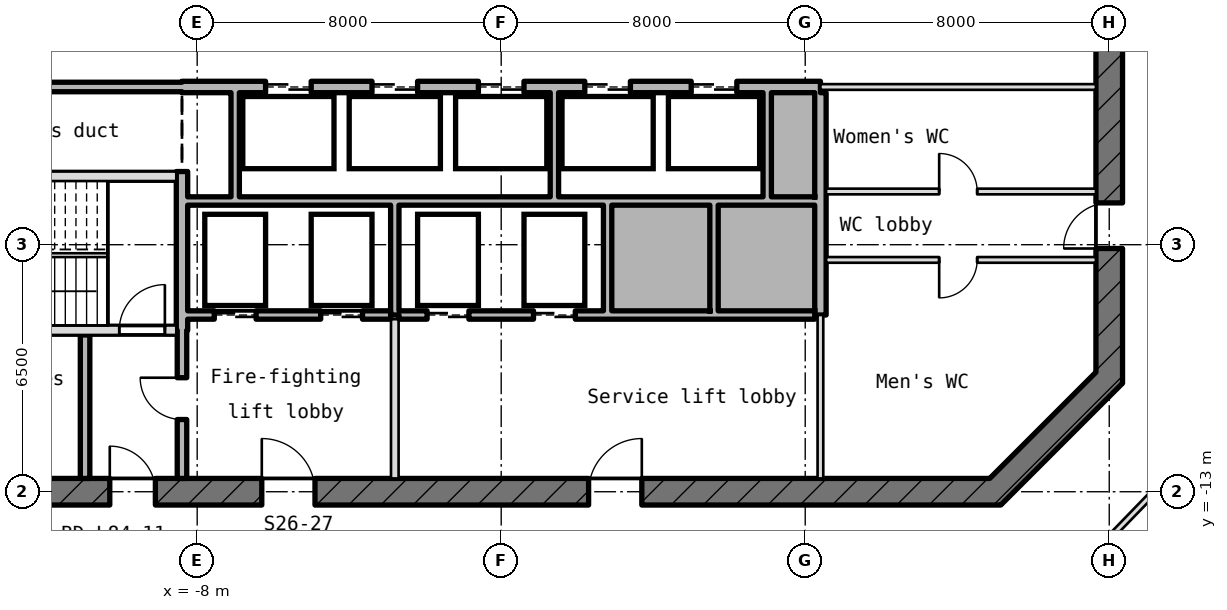
"""IFC4 building model, lengths in metres.
Left out: names, types, materials, properties, quantities, classifications, styles, units other than length and angle.
Written with IfcOpenShell. Run it as: python <this file> out.ifc"""

import sys

from ifc_helpers import new_model, si_unit, direction, frame, frame_2d, origin, place, context, subcontext, project, spatial, rectangle, extrude, element, fill, save


model = new_model("IFC4")
c1 = context("Model", 3, precision=1e-05, world=origin(), true_north=direction((0.0, 1.0)))
c2 = subcontext(c1, "Body", "Model", "MODEL_VIEW")
j1 = project(units=[si_unit("LENGTHUNIT", "METRE"), si_unit("PLANEANGLEUNIT", "RADIAN")], contexts=[c1])
p1 = place(None, origin())
s1 = spatial("IfcSite", under=j1, at=p1, CompositionType="ELEMENT")
p2 = place(p1, origin())
s2 = spatial("IfcBuilding", under=s1, at=p2, CompositionType="ELEMENT")
p3 = place(p2, frame((0.0, 0.0, 371.65)))
s3 = spatial("IfcBuildingStorey", under=s2, at=p3, CompositionType="ELEMENT", Elevation=371.65)
p4 = place(p3, frame((12.897, -13.103, -0.18), z_axis=(0.0, 0.0, 1.0), x_axis=(0.707106781187, 0.707106781187, 0.0)))
e1 = element("IfcWall", 1, at=p4, inside=s3, PredefinedType="SHEAR", context=c2, shape_type="SweptSolid", body=[
    extrude(rectangle(XDim=4.533, YDim=0.7, at=frame_2d((2.266, 0.0))), origin(), (0.0, 0.0, 1.0), 4.15),
])
p5 = place(p3, frame((16.0, -10.145, -0.18), z_axis=(0.0, 0.0, 1.0), x_axis=(0.0, 1.0, 0.0)))
e2 = element("IfcWall", 2, at=p5, inside=s3, PredefinedType="SHEAR", context=c2, shape_type="SweptSolid", body=[
    extrude(rectangle(XDim=20.29, YDim=0.7, at=frame_2d((10.145, 0.0))), origin(), (0.0, 0.0, 1.0), 4.15),
])
p6 = place(p5, frame((8.945, 0.0, 0.18)))
e3 = element("IfcOpeningElement", 3, at=p6, cuts=e2, PredefinedType="OPENING", context=c2, shape_type="SweptSolid", body=[
    extrude(rectangle(XDim=2.4, YDim=2.1, at=frame_2d((1.2, 1.05))), frame((0.0, 0.36, 0.0), z_axis=(0.0, -1.0, 0.0), x_axis=(1.0, 0.0, 0.0)), (0.0, 0.0, 1.0), 0.72),
])
p7 = place(p5, frame((13.545, 0.0, 0.18)))
e4 = element("IfcOpeningElement", 4, at=p7, cuts=e2, PredefinedType="OPENING", context=c2, shape_type="SweptSolid", body=[
    extrude(rectangle(XDim=1.2, YDim=2.1, at=frame_2d((0.6, 1.05))), frame((0.0, 0.36, 0.0), z_axis=(0.0, -1.0, 0.0), x_axis=(1.0, 0.0, 0.0)), (0.0, 0.0, 1.0), 0.72),
])
p8 = place(p5, frame((3.545, 0.0, 0.18)))
e5 = element("IfcOpeningElement", 5, at=p8, cuts=e2, PredefinedType="OPENING", context=c2, shape_type="SweptSolid", body=[
    extrude(rectangle(XDim=1.2, YDim=2.1, at=frame_2d((0.6, 1.05))), frame((0.0, 0.36, 0.0), z_axis=(0.0, -1.0, 0.0), x_axis=(1.0, 0.0, 0.0)), (0.0, 0.0, 1.0), 0.72),
])
p9 = place(p3, frame((-13.145, -13.0, -0.18), z_axis=(0.0, 0.0, 1.0), x_axis=(1.0, 0.0, 0.0)))
e6 = element("IfcWall", 6, at=p9, inside=s3, PredefinedType="SHEAR", context=c2, shape_type="SweptSolid", body=[
    extrude(rectangle(XDim=26.29, YDim=0.7, at=frame_2d((13.145, 0.0))), origin(), (0.0, 0.0, 1.0), 4.15),
])
p10 = place(p9, frame((2.845, 0.0, 0.18)))
e7 = element("IfcOpeningElement", 7, at=p10, cuts=e6, PredefinedType="OPENING", context=c2, shape_type="SweptSolid", body=[
    extrude(rectangle(XDim=1.2, YDim=2.1, at=frame_2d((0.6, 1.05))), frame((0.0, 0.36, 0.0), z_axis=(0.0, -1.0, 0.0), x_axis=(1.0, 0.0, 0.0)), (0.0, 0.0, 1.0), 0.72),
])
p11 = place(p9, frame((6.845, 0.0, 0.18)))
e8 = element("IfcOpeningElement", 8, at=p11, cuts=e6, PredefinedType="OPENING", context=c2, shape_type="SweptSolid", body=[
    extrude(rectangle(XDim=1.4, YDim=2.1, at=frame_2d((0.7, 1.05))), frame((0.0, 0.36, 0.0), z_axis=(0.0, -1.0, 0.0), x_axis=(1.0, 0.0, 0.0)), (0.0, 0.0, 1.0), 0.72),
])
p12 = place(p9, frame((15.445, 0.0, 0.18)))
e9 = element("IfcOpeningElement", 9, at=p12, cuts=e6, PredefinedType="OPENING", context=c2, shape_type="SweptSolid", body=[
    extrude(rectangle(XDim=1.4, YDim=2.1, at=frame_2d((0.7, 1.05))), frame((0.0, 0.36, 0.0), z_axis=(0.0, -1.0, 0.0), x_axis=(1.0, 0.0, 0.0)), (0.0, 0.0, 1.0), 0.72),
])
p13 = place(p3, frame((-15.65, -8.75, -0.18), z_axis=(0.0, 0.0, 1.0), x_axis=(1.0, 0.0, 0.0)))
e10 = element("IfcWall", 10, at=p13, inside=s3, PredefinedType="SHEAR", context=c2, shape_type="SweptSolid", body=[
    extrude(rectangle(XDim=7.1, YDim=0.25, at=frame_2d((3.55, 0.0))), origin(), (0.0, 0.0, 1.0), 4.15),
])
p14 = place(p13, frame((5.6, 0.0, 0.18)))
e11 = element("IfcOpeningElement", 11, at=p14, cuts=e10, PredefinedType="OPENING", context=c2, shape_type="SweptSolid", body=[
    extrude(rectangle(XDim=1.2, YDim=2.1, at=frame_2d((0.6, 1.05))), frame((0.0, 0.135, 0.0), z_axis=(0.0, -1.0, 0.0), x_axis=(1.0, 0.0, 0.0)), (0.0, 0.0, 1.0), 0.27),
])
p15 = place(p3, frame((-8.25, -8.35, 0.0), z_axis=(0.0, 0.0, 1.0), x_axis=(1.0, 0.0, 0.0)))
e12 = element("IfcWall", 12, at=p15, inside=s3, PredefinedType="STANDARD", context=c2, shape_type="SweptSolid", body=[
    extrude(rectangle(XDim=5.34, YDim=0.22, at=frame_2d((2.67, 0.0))), origin(), (0.0, 0.0, 1.0), 3.97),
])
p16 = place(p15, frame((0.7, 0.0, 0.0)))
e13 = element("IfcOpeningElement", 13, at=p16, cuts=e12, PredefinedType="OPENING", context=c2, shape_type="SweptSolid", body=[
    extrude(rectangle(XDim=1.1, YDim=2.1, at=frame_2d((0.55, 1.05))), frame((0.0, 0.12, 0.0), z_axis=(0.0, -1.0, 0.0), x_axis=(1.0, 0.0, 0.0)), (0.0, 0.0, 1.0), 0.24),
])
p17 = place(p15, frame((3.5, 0.0, 0.0)))
e14 = element("IfcOpeningElement", 14, at=p17, cuts=e12, PredefinedType="OPENING", context=c2, shape_type="SweptSolid", body=[
    extrude(rectangle(XDim=1.1, YDim=2.1, at=frame_2d((0.55, 1.05))), frame((0.0, 0.12, 0.0), z_axis=(0.0, -1.0, 0.0), x_axis=(1.0, 0.0, 0.0)), (0.0, 0.0, 1.0), 0.24),
])
p18 = place(p3, frame((-2.69, -8.35, 0.0), z_axis=(0.0, 0.0, 1.0), x_axis=(1.0, 0.0, 0.0)))
e15 = element("IfcWall", 15, at=p18, inside=s3, PredefinedType="STANDARD", context=c2, shape_type="SweptSolid", body=[
    extrude(rectangle(XDim=10.94, YDim=0.22, at=frame_2d((5.47, 0.0))), origin(), (0.0, 0.0, 1.0), 3.97),
])
p19 = place(p18, frame((0.74, 0.0, 0.0)))
e16 = element("IfcOpeningElement", 16, at=p19, cuts=e15, PredefinedType="OPENING", context=c2, shape_type="SweptSolid", body=[
    extrude(rectangle(XDim=1.1, YDim=2.1, at=frame_2d((0.55, 1.05))), frame((0.0, 0.12, 0.0), z_axis=(0.0, -1.0, 0.0), x_axis=(1.0, 0.0, 0.0)), (0.0, 0.0, 1.0), 0.24),
])
p20 = place(p18, frame((3.54, 0.0, 0.0)))
e17 = element("IfcOpeningElement", 17, at=p20, cuts=e15, PredefinedType="OPENING", context=c2, shape_type="SweptSolid", body=[
    extrude(rectangle(XDim=1.1, YDim=2.1, at=frame_2d((0.55, 1.05))), frame((0.0, 0.12, 0.0), z_axis=(0.0, -1.0, 0.0), x_axis=(1.0, 0.0, 0.0)), (0.0, 0.0, 1.0), 0.24),
])
p21 = place(p3, frame((8.55, -6.9, 0.0), z_axis=(0.0, 0.0, 1.0), x_axis=(1.0, 0.0, 0.0)))
e18 = element("IfcWall", 18, at=p21, inside=s3, PredefinedType="PARTITIONING", context=c2, shape_type="SweptSolid", body=[
    extrude(rectangle(XDim=7.1, YDim=0.15, at=frame_2d((3.55, 0.0))), origin(), (0.0, 0.0, 1.0), 3.97),
])
p22 = place(p21, frame((2.975, 0.0, 0.0)))
e19 = element("IfcOpeningElement", 19, at=p22, cuts=e18, PredefinedType="OPENING", context=c2, shape_type="SweptSolid", body=[
    extrude(rectangle(XDim=1.0, YDim=2.1, at=frame_2d((0.5, 1.05))), frame((0.0, 0.085, 0.0), z_axis=(0.0, -1.0, 0.0), x_axis=(1.0, 0.0, 0.0)), (0.0, 0.0, 1.0), 0.17),
])
p23 = place(p3, frame((-8.25, -5.35, 0.0), z_axis=(0.0, 0.0, 1.0), x_axis=(1.0, 0.0, 0.0)))
e20 = element("IfcWall", 20, at=p23, inside=s3, PredefinedType="STANDARD", context=c2, shape_type="SweptSolid", body=[
    extrude(rectangle(XDim=16.5, YDim=0.22, at=frame_2d((8.25, 0.0))), origin(), (0.0, 0.0, 1.0), 3.97),
])
p24 = place(p3, frame((8.55, -5.1, 0.0), z_axis=(0.0, 0.0, 1.0), x_axis=(1.0, 0.0, 0.0)))
e21 = element("IfcWall", 21, at=p24, inside=s3, PredefinedType="PARTITIONING", context=c2, shape_type="SweptSolid", body=[
    extrude(rectangle(XDim=7.1, YDim=0.15, at=frame_2d((3.55, 0.0))), origin(), (0.0, 0.0, 1.0), 3.97),
])
p25 = place(p24, frame((2.975, 0.0, 0.0)))
e22 = element("IfcOpeningElement", 22, at=p25, cuts=e21, PredefinedType="OPENING", context=c2, shape_type="SweptSolid", body=[
    extrude(rectangle(XDim=1.0, YDim=2.1, at=frame_2d((0.5, 1.05))), frame((0.0, 0.085, 0.0), z_axis=(0.0, -1.0, 0.0), x_axis=(1.0, 0.0, 0.0)), (0.0, 0.0, 1.0), 0.17),
])
p26 = place(p3, frame((-15.65, -4.7, -0.18), z_axis=(0.0, 0.0, 1.0), x_axis=(1.0, 0.0, 0.0)))
e23 = element("IfcWall", 23, at=p26, inside=s3, PredefinedType="SHEAR", context=c2, shape_type="SweptSolid", body=[
    extrude(rectangle(XDim=7.1, YDim=0.25, at=frame_2d((3.55, 0.0))), origin(), (0.0, 0.0, 1.0), 4.15),
])
p27 = place(p3, frame((-15.65, -2.35, 0.0), z_axis=(0.0, 0.0, 1.0), x_axis=(1.0, 0.0, 0.0)))
e24 = element("IfcWall", 24, at=p27, inside=s3, PredefinedType="STANDARD", context=c2, shape_type="SweptSolid", body=[
    extrude(rectangle(XDim=7.25, YDim=0.25, at=frame_2d((3.625, 0.0))), origin(), (0.0, 0.0, 1.0), 3.97),
])
p28 = place(p3, frame((-8.4, -2.35, -0.18), z_axis=(0.0, 0.0, 1.0), x_axis=(1.0, 0.0, 0.0)))
e25 = element("IfcWall", 25, at=p28, inside=s3, PredefinedType="SHEAR", context=c2, shape_type="SweptSolid", body=[
    extrude(rectangle(XDim=16.8, YDim=0.3, at=frame_2d((8.4, 0.0))), origin(), (0.0, 0.0, 1.0), 4.15),
])
p29 = place(p28, frame((2.2, 0.0, 0.18)))
e26 = element("IfcOpeningElement", 26, at=p29, cuts=e25, PredefinedType="OPENING", context=c2, shape_type="SweptSolid", body=[
    extrude(rectangle(XDim=1.2, YDim=2.1, at=frame_2d((0.6, 1.05))), frame((0.0, 0.16, 0.0), z_axis=(0.0, -1.0, 0.0), x_axis=(1.0, 0.0, 0.0)), (0.0, 0.0, 1.0), 0.32),
])
p30 = place(p28, frame((5.0, 0.0, 0.18)))
e27 = element("IfcOpeningElement", 27, at=p30, cuts=e25, PredefinedType="OPENING", context=c2, shape_type="SweptSolid", body=[
    extrude(rectangle(XDim=1.2, YDim=2.1, at=frame_2d((0.6, 1.05))), frame((0.0, 0.16, 0.0), z_axis=(0.0, -1.0, 0.0), x_axis=(1.0, 0.0, 0.0)), (0.0, 0.0, 1.0), 0.32),
])
p31 = place(p28, frame((7.8, 0.0, 0.18)))
e28 = element("IfcOpeningElement", 28, at=p31, cuts=e25, PredefinedType="OPENING", context=c2, shape_type="SweptSolid", body=[
    extrude(rectangle(XDim=1.2, YDim=2.1, at=frame_2d((0.6, 1.05))), frame((0.0, 0.16, 0.0), z_axis=(0.0, -1.0, 0.0), x_axis=(1.0, 0.0, 0.0)), (0.0, 0.0, 1.0), 0.32),
])
p32 = place(p28, frame((10.6, 0.0, 0.18)))
e29 = element("IfcOpeningElement", 29, at=p32, cuts=e25, PredefinedType="OPENING", context=c2, shape_type="SweptSolid", body=[
    extrude(rectangle(XDim=1.2, YDim=2.1, at=frame_2d((0.6, 1.05))), frame((0.0, 0.16, 0.0), z_axis=(0.0, -1.0, 0.0), x_axis=(1.0, 0.0, 0.0)), (0.0, 0.0, 1.0), 0.32),
])
p33 = place(p28, frame((13.4, 0.0, 0.18)))
e30 = element("IfcOpeningElement", 30, at=p33, cuts=e25, PredefinedType="OPENING", context=c2, shape_type="SweptSolid", body=[
    extrude(rectangle(XDim=1.2, YDim=2.1, at=frame_2d((0.6, 1.05))), frame((0.0, 0.16, 0.0), z_axis=(0.0, -1.0, 0.0), x_axis=(1.0, 0.0, 0.0)), (0.0, 0.0, 1.0), 0.32),
])
p34 = place(p3, frame((8.4, -2.35, 0.0), z_axis=(0.0, 0.0, 1.0), x_axis=(1.0, 0.0, 0.0)))
e31 = element("IfcWall", 31, at=p34, inside=s3, PredefinedType="PARTITIONING", context=c2, shape_type="SweptSolid", body=[
    extrude(rectangle(XDim=7.25, YDim=0.15, at=frame_2d((3.625, 0.0))), origin(), (0.0, 0.0, 1.0), 3.97),
])
p35 = place(p3, frame((-10.95, -12.65, 0.0), z_axis=(0.0, 0.0, 1.0), x_axis=(0.0, 1.0, 0.0)))
e32 = element("IfcWall", 32, at=p35, inside=s3, PredefinedType="STANDARD", context=c2, shape_type="SweptSolid", body=[
    extrude(rectangle(XDim=3.775, YDim=0.25, at=frame_2d((1.887, 0.0))), origin(), (0.0, 0.0, 1.0), 3.97),
])
p36 = place(p3, frame((-8.4, -12.65, 0.0), z_axis=(0.0, 0.0, 1.0), x_axis=(0.0, 1.0, 0.0)))
e33 = element("IfcWall", 33, at=p36, inside=s3, PredefinedType="STANDARD", context=c2, shape_type="SweptSolid", body=[
    extrude(rectangle(XDim=3.9, YDim=0.25, at=frame_2d((1.95, 0.0))), origin(), (0.0, 0.0, 1.0), 3.97),
])
p37 = place(p36, frame((1.55, 0.0, 0.0)))
e34 = element("IfcOpeningElement", 34, at=p37, cuts=e33, PredefinedType="OPENING", context=c2, shape_type="SweptSolid", body=[
    extrude(rectangle(XDim=1.1, YDim=2.1, at=frame_2d((0.55, 1.05))), frame((0.0, 0.135, 0.0), z_axis=(0.0, -1.0, 0.0), x_axis=(1.0, 0.0, 0.0)), (0.0, 0.0, 1.0), 0.27),
])
p38 = place(p3, frame((-8.4, -8.75, -0.18), z_axis=(0.0, 0.0, 1.0), x_axis=(0.0, 1.0, 0.0)))
e35 = element("IfcWall", 35, at=p38, inside=s3, PredefinedType="SHEAR", context=c2, shape_type="SweptSolid", body=[
    extrude(rectangle(XDim=4.175, YDim=0.3, at=frame_2d((2.087, 0.0))), origin(), (0.0, 0.0, 1.0), 4.15),
])
p39 = place(p3, frame((-7.0, -5.24, 0.0), z_axis=(0.0, 0.0, 1.0), x_axis=(0.0, 1.0, 0.0)))
e36 = element("IfcWall", 36, at=p39, inside=s3, PredefinedType="STANDARD", context=c2, shape_type="SweptSolid", body=[
    extrude(rectangle(XDim=2.74, YDim=0.22, at=frame_2d((1.37, 0.0))), origin(), (0.0, 0.0, 1.0), 3.97),
])
p40 = place(p3, frame((-2.8, -12.65, 0.0), z_axis=(0.0, 0.0, 1.0), x_axis=(0.0, 1.0, 0.0)))
e37 = element("IfcWall", 37, at=p40, inside=s3, PredefinedType="PARTITIONING", context=c2, shape_type="SweptSolid", body=[
    extrude(rectangle(XDim=4.19, YDim=0.2, at=frame_2d((2.095, 0.0))), origin(), (0.0, 0.0, 1.0), 3.97),
])
p41 = place(p3, frame((-2.8, -8.35, 0.0), z_axis=(0.0, 0.0, 1.0), x_axis=(0.0, 1.0, 0.0)))
e38 = element("IfcWall", 38, at=p41, inside=s3, PredefinedType="STANDARD", context=c2, shape_type="SweptSolid", body=[
    extrude(rectangle(XDim=2.89, YDim=0.22, at=frame_2d((1.445, 0.0))), origin(), (0.0, 0.0, 1.0), 3.97),
])
p42 = place(p3, frame((1.4, -5.24, 0.0), z_axis=(0.0, 0.0, 1.0), x_axis=(0.0, 1.0, 0.0)))
e39 = element("IfcWall", 39, at=p42, inside=s3, PredefinedType="STANDARD", context=c2, shape_type="SweptSolid", body=[
    extrude(rectangle(XDim=2.74, YDim=0.22, at=frame_2d((1.37, 0.0))), origin(), (0.0, 0.0, 1.0), 3.97),
])
for number, where, z_axis, x_axis in (
    (40, (2.8, -8.24, 0.0), (0.0, 0.0, 1.0), (0.0, 1.0, 0.0)),
    (41, (5.6, -8.24, 0.0), (0.0, 0.0, 1.0), (0.0, 1.0, 0.0)),
):
    element("IfcWall", number, at=place(p3, frame(where, z_axis=z_axis, x_axis=x_axis)), inside=s3, PredefinedType="STANDARD", context=c2, shape_type="SweptSolid", body=[
        extrude(rectangle(XDim=2.78, YDim=0.22, at=frame_2d((1.39, 0.0))), origin(), (0.0, 0.0, 1.0), 3.97),
    ])
p43 = place(p3, frame((7.0, -5.24, 0.0), z_axis=(0.0, 0.0, 1.0), x_axis=(0.0, 1.0, 0.0)))
e42 = element("IfcWall", 42, at=p43, inside=s3, PredefinedType="STANDARD", context=c2, shape_type="SweptSolid", body=[
    extrude(rectangle(XDim=2.74, YDim=0.22, at=frame_2d((1.37, 0.0))), origin(), (0.0, 0.0, 1.0), 3.97),
])
p44 = place(p3, frame((8.4, -12.65, 0.0), z_axis=(0.0, 0.0, 1.0), x_axis=(0.0, 1.0, 0.0)))
e43 = element("IfcWall", 43, at=p44, inside=s3, PredefinedType="PARTITIONING", context=c2, shape_type="SweptSolid", body=[
    extrude(rectangle(XDim=4.3, YDim=0.15, at=frame_2d((2.15, 0.0))), origin(), (0.0, 0.0, 1.0), 3.97),
])
p45 = place(p3, frame((8.4, -8.35, -0.18), z_axis=(0.0, 0.0, 1.0), x_axis=(0.0, 1.0, 0.0)))
e44 = element("IfcWall", 44, at=p45, inside=s3, PredefinedType="SHEAR", context=c2, shape_type="SweptSolid", body=[
    extrude(rectangle(XDim=5.85, YDim=0.3, at=frame_2d((2.925, 0.0))), origin(), (0.0, 0.0, 1.0), 4.15),
])
p46 = place(p3, frame((19.05, -11.077, 0.0), z_axis=(0.0, 0.0, 1.0), x_axis=(-0.695824202045, -0.718212141257, 0.0)))
e45 = element("IfcWall", 45, at=p46, inside=s3, PredefinedType="PARTITIONING", context=c2, shape_type="SweptSolid", body=[
    extrude(rectangle(XDim=6.925, YDim=0.15, at=frame_2d((3.462, 0.0))), origin(), (0.0, 0.0, 1.0), 3.97),
])
p47 = place(p29, origin())
e46 = element("IfcDoor", 46, at=p47, inside=s3, OperationType="DOUBLE_DOOR_SLIDING", PredefinedType="DOOR", context=c2, shape_type="SweptSolid", body=[
    extrude(rectangle(XDim=1.2, YDim=2.1, at=frame_2d((0.6, 1.05))), frame((0.0, 0.025, 0.0), z_axis=(0.0, -1.0, 0.0), x_axis=(1.0, 0.0, 0.0)), (0.0, 0.0, 1.0), 0.05),
])
fill(e26, e46)
p48 = place(p30, origin())
e47 = element("IfcDoor", 47, at=p48, inside=s3, OperationType="DOUBLE_DOOR_SLIDING", PredefinedType="DOOR", context=c2, shape_type="SweptSolid", body=[
    extrude(rectangle(XDim=1.2, YDim=2.1, at=frame_2d((0.6, 1.05))), frame((0.0, 0.025, 0.0), z_axis=(0.0, -1.0, 0.0), x_axis=(1.0, 0.0, 0.0)), (0.0, 0.0, 1.0), 0.05),
])
fill(e27, e47)
p49 = place(p31, origin())
e48 = element("IfcDoor", 48, at=p49, inside=s3, OperationType="DOUBLE_DOOR_SLIDING", PredefinedType="DOOR", context=c2, shape_type="SweptSolid", body=[
    extrude(rectangle(XDim=1.2, YDim=2.1, at=frame_2d((0.6, 1.05))), frame((0.0, 0.025, 0.0), z_axis=(0.0, -1.0, 0.0), x_axis=(1.0, 0.0, 0.0)), (0.0, 0.0, 1.0), 0.05),
])
fill(e28, e48)
p50 = place(p32, origin())
e49 = element("IfcDoor", 49, at=p50, inside=s3, OperationType="DOUBLE_DOOR_SLIDING", PredefinedType="DOOR", context=c2, shape_type="SweptSolid", body=[
    extrude(rectangle(XDim=1.2, YDim=2.1, at=frame_2d((0.6, 1.05))), frame((0.0, 0.025, 0.0), z_axis=(0.0, -1.0, 0.0), x_axis=(1.0, 0.0, 0.0)), (0.0, 0.0, 1.0), 0.05),
])
fill(e29, e49)
p51 = place(p33, origin())
e50 = element("IfcDoor", 50, at=p51, inside=s3, OperationType="DOUBLE_DOOR_SLIDING", PredefinedType="DOOR", context=c2, shape_type="SweptSolid", body=[
    extrude(rectangle(XDim=1.2, YDim=2.1, at=frame_2d((0.6, 1.05))), frame((0.0, 0.025, 0.0), z_axis=(0.0, -1.0, 0.0), x_axis=(1.0, 0.0, 0.0)), (0.0, 0.0, 1.0), 0.05),
])
fill(e30, e50)
p52 = place(p16, origin())
e51 = element("IfcDoor", 51, at=p52, inside=s3, OperationType="DOUBLE_DOOR_SLIDING", PredefinedType="DOOR", context=c2, shape_type="SweptSolid", body=[
    extrude(rectangle(XDim=1.1, YDim=2.1, at=frame_2d((0.55, 1.05))), frame((0.0, 0.025, 0.0), z_axis=(0.0, -1.0, 0.0), x_axis=(1.0, 0.0, 0.0)), (0.0, 0.0, 1.0), 0.05),
])
fill(e13, e51)
p53 = place(p17, origin())
e52 = element("IfcDoor", 52, at=p53, inside=s3, OperationType="DOUBLE_DOOR_SLIDING", PredefinedType="DOOR", context=c2, shape_type="SweptSolid", body=[
    extrude(rectangle(XDim=1.1, YDim=2.1, at=frame_2d((0.55, 1.05))), frame((0.0, 0.025, 0.0), z_axis=(0.0, -1.0, 0.0), x_axis=(1.0, 0.0, 0.0)), (0.0, 0.0, 1.0), 0.05),
])
fill(e14, e52)
p54 = place(p19, origin())
e53 = element("IfcDoor", 53, at=p54, inside=s3, OperationType="DOUBLE_DOOR_SLIDING", PredefinedType="DOOR", context=c2, shape_type="SweptSolid", body=[
    extrude(rectangle(XDim=1.1, YDim=2.1, at=frame_2d((0.55, 1.05))), frame((0.0, 0.025, 0.0), z_axis=(0.0, -1.0, 0.0), x_axis=(1.0, 0.0, 0.0)), (0.0, 0.0, 1.0), 0.05),
])
fill(e16, e53)
p55 = place(p20, origin())
e54 = element("IfcDoor", 54, at=p55, inside=s3, OperationType="DOUBLE_DOOR_SLIDING", PredefinedType="DOOR", context=c2, shape_type="SweptSolid", body=[
    extrude(rectangle(XDim=1.1, YDim=2.1, at=frame_2d((0.55, 1.05))), frame((0.0, 0.025, 0.0), z_axis=(0.0, -1.0, 0.0), x_axis=(1.0, 0.0, 0.0)), (0.0, 0.0, 1.0), 0.05),
])
fill(e17, e54)
p56 = place(p14, origin())
e55 = element("IfcDoor", 55, at=p56, inside=s3, OperationType="SINGLE_SWING_RIGHT", PredefinedType="DOOR", context=c2, shape_type="SweptSolid", body=[
    extrude(rectangle(XDim=1.2, YDim=2.1, at=frame_2d((0.6, 1.05))), frame((0.0, 0.025, 0.0), z_axis=(0.0, -1.0, 0.0), x_axis=(1.0, 0.0, 0.0)), (0.0, 0.0, 1.0), 0.05),
])
fill(e11, e55)
p57 = place(p37, origin())
e56 = element("IfcDoor", 56, at=p57, inside=s3, OperationType="SINGLE_SWING_RIGHT", PredefinedType="DOOR", context=c2, shape_type="SweptSolid", body=[
    extrude(rectangle(XDim=1.1, YDim=2.1, at=frame_2d((0.55, 1.05))), frame((0.0, 0.025, 0.0), z_axis=(0.0, -1.0, 0.0), x_axis=(1.0, 0.0, 0.0)), (0.0, 0.0, 1.0), 0.05),
])
fill(e34, e56)
p58 = place(p10, origin())
e57 = element("IfcDoor", 57, at=p58, inside=s3, OperationType="SINGLE_SWING_RIGHT", PredefinedType="DOOR", context=c2, shape_type="SweptSolid", body=[
    extrude(rectangle(XDim=1.2, YDim=2.1, at=frame_2d((0.6, 1.05))), frame((0.0, 0.025, 0.0), z_axis=(0.0, -1.0, 0.0), x_axis=(1.0, 0.0, 0.0)), (0.0, 0.0, 1.0), 0.05),
])
fill(e7, e57)
p59 = place(p11, origin())
e58 = element("IfcDoor", 58, at=p59, inside=s3, OperationType="SINGLE_SWING_RIGHT", PredefinedType="DOOR", context=c2, shape_type="SweptSolid", body=[
    extrude(rectangle(XDim=1.4, YDim=2.1, at=frame_2d((0.7, 1.05))), frame((0.0, 0.025, 0.0), z_axis=(0.0, -1.0, 0.0), x_axis=(1.0, 0.0, 0.0)), (0.0, 0.0, 1.0), 0.05),
])
fill(e8, e58)
p60 = place(p12, origin())
e59 = element("IfcDoor", 59, at=p60, inside=s3, OperationType="SINGLE_SWING_RIGHT", PredefinedType="DOOR", context=c2, shape_type="SweptSolid", body=[
    extrude(rectangle(XDim=1.4, YDim=2.1, at=frame_2d((0.7, 1.05))), frame((0.0, 0.025, 0.0), z_axis=(0.0, -1.0, 0.0), x_axis=(1.0, 0.0, 0.0)), (0.0, 0.0, 1.0), 0.05),
])
fill(e9, e59)
p61 = place(p25, origin())
e60 = element("IfcDoor", 60, at=p61, inside=s3, OperationType="SINGLE_SWING_RIGHT", PredefinedType="DOOR", context=c2, shape_type="SweptSolid", body=[
    extrude(rectangle(XDim=1.0, YDim=2.1, at=frame_2d((0.5, 1.05))), frame((0.0, 0.025, 0.0), z_axis=(0.0, -1.0, 0.0), x_axis=(1.0, 0.0, 0.0)), (0.0, 0.0, 1.0), 0.05),
])
fill(e22, e60)
p62 = place(p8, origin())
e61 = element("IfcDoor", 61, at=p62, inside=s3, OperationType="SINGLE_SWING_RIGHT", PredefinedType="DOOR", context=c2, shape_type="SweptSolid", body=[
    extrude(rectangle(XDim=1.2, YDim=2.1, at=frame_2d((0.6, 1.05))), frame((0.0, 0.025, 0.0), z_axis=(0.0, -1.0, 0.0), x_axis=(1.0, 0.0, 0.0)), (0.0, 0.0, 1.0), 0.05),
])
fill(e5, e61)
p63 = place(p22, frame((1.0, 0.0, 0.0), z_axis=(0.0, 0.0, 1.0), x_axis=(-1.0, 0.0, 0.0)))
e62 = element("IfcDoor", 62, at=p63, inside=s3, OperationType="SINGLE_SWING_LEFT", PredefinedType="DOOR", context=c2, shape_type="SweptSolid", body=[
    extrude(rectangle(XDim=1.0, YDim=2.1, at=frame_2d((0.5, 1.05))), frame((0.0, 0.025, 0.0), z_axis=(0.0, -1.0, 0.0), x_axis=(1.0, 0.0, 0.0)), (0.0, 0.0, 1.0), 0.05),
])
fill(e19, e62)
save(model, sys.argv[1])
